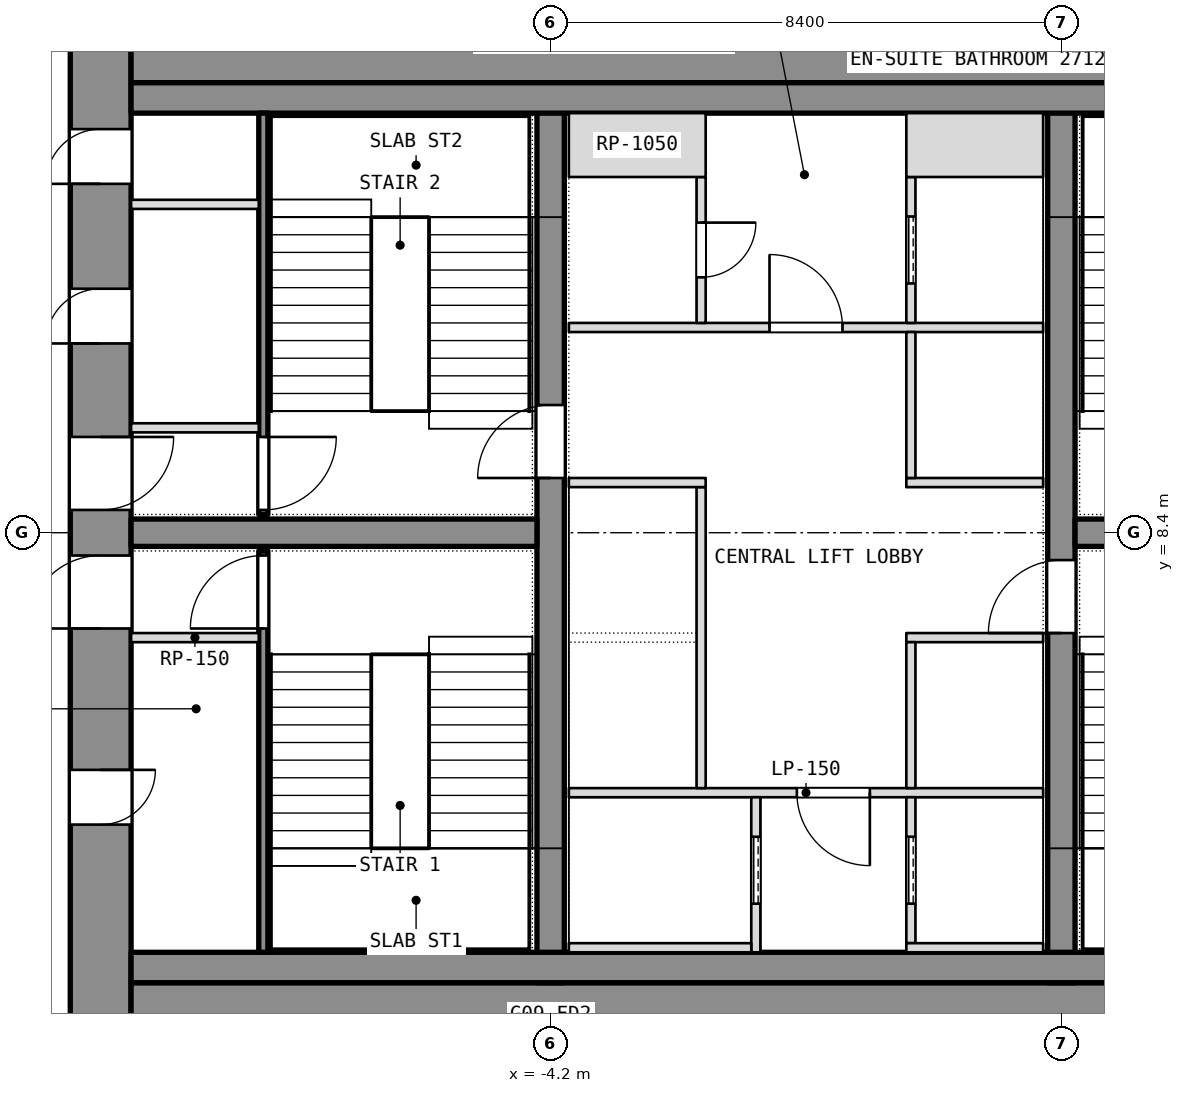
"""IFC4 building model, lengths in metres.
Left out: names, types, materials, properties, quantities, classifications, styles, units other than length and angle.
Written with IfcOpenShell. Run it as: python <this file> out.ifc"""

import sys

from ifc_helpers import new_model, si_unit, direction, frame, frame_2d, origin, place, context, subcontext, project, spatial, rectangle, extrude, element, fill, save


model = new_model("IFC4")
c1 = context("Model", 3, precision=1e-05, world=origin(), true_north=direction((0.0, 1.0)))
c2 = subcontext(c1, "Body", "Model", "MODEL_VIEW")
j1 = project(units=[si_unit("LENGTHUNIT", "METRE"), si_unit("PLANEANGLEUNIT", "RADIAN")], contexts=[c1])
p1 = place(None, origin())
s1 = spatial("IfcSite", under=j1, at=p1, CompositionType="ELEMENT")
p2 = place(p1, origin())
s2 = spatial("IfcBuilding", under=s1, at=p2, CompositionType="ELEMENT")
p3 = place(p2, frame((0.0, 0.0, 122.9)))
s3 = spatial("IfcBuildingStorey", under=s2, at=p3, CompositionType="ELEMENT", Elevation=122.9)
p4 = place(p3, frame((-11.6, 0.0, 0.0), z_axis=(0.0, 0.0, 1.0), x_axis=(0.0, 1.0, 0.0)))
e1 = element("IfcWall", 1, at=p4, inside=s3, PredefinedType="SHEAR", context=c2, shape_type="SweptSolid", body=[
    extrude(rectangle(XDim=16.8, YDim=1.0, at=frame_2d((8.4, 0.0))), origin(), (0.0, 0.0, 1.0), 3.6),
])
p5 = place(p4, frame((3.6, 0.0, 0.0)))
e2 = element("IfcOpeningElement", 2, at=p5, cuts=e1, PredefinedType="OPENING", context=c2, shape_type="SweptSolid", body=[
    extrude(rectangle(XDim=0.9, YDim=2.1, at=frame_2d((0.45, 1.05))), frame((0.0, 0.5, 0.0), z_axis=(0.0, -1.0, 0.0), x_axis=(1.0, 0.0, 0.0)), (0.0, 0.0, 1.0), 1.0),
])
p6 = place(p4, frame((6.825, 0.0, 0.0)))
e3 = element("IfcOpeningElement", 3, at=p6, cuts=e1, PredefinedType="OPENING", context=c2, shape_type="SweptSolid", body=[
    extrude(rectangle(XDim=1.2, YDim=2.1, at=frame_2d((0.6, 1.05))), frame((0.0, 0.5, 0.0), z_axis=(0.0, -1.0, 0.0), x_axis=(1.0, 0.0, 0.0)), (0.0, 0.0, 1.0), 1.0),
])
p7 = place(p4, frame((14.137, 0.0, 0.0)))
e4 = element("IfcOpeningElement", 4, at=p7, cuts=e1, PredefinedType="OPENING", context=c2, shape_type="SweptSolid", body=[
    extrude(rectangle(XDim=0.9, YDim=2.1, at=frame_2d((0.45, 1.05))), frame((0.0, 0.5, 0.0), z_axis=(0.0, -1.0, 0.0), x_axis=(1.0, 0.0, 0.0)), (0.0, 0.0, 1.0), 1.0),
])
p8 = place(p4, frame((11.512, 0.0, 0.0)))
e5 = element("IfcOpeningElement", 5, at=p8, cuts=e1, PredefinedType="OPENING", context=c2, shape_type="SweptSolid", body=[
    extrude(rectangle(XDim=0.9, YDim=2.1, at=frame_2d((0.45, 1.05))), frame((0.0, 0.5, 0.0), z_axis=(0.0, -1.0, 0.0), x_axis=(1.0, 0.0, 0.0)), (0.0, 0.0, 1.0), 1.0),
])
p9 = place(p4, frame((8.775, 0.0, 0.0)))
e6 = element("IfcOpeningElement", 6, at=p9, cuts=e1, PredefinedType="OPENING", context=c2, shape_type="SweptSolid", body=[
    extrude(rectangle(XDim=1.2, YDim=2.1, at=frame_2d((0.6, 1.05))), frame((0.0, 0.5, 0.0), z_axis=(0.0, -1.0, 0.0), x_axis=(1.0, 0.0, 0.0)), (0.0, 0.0, 1.0), 1.0),
])
for number, where, z_axis, x_axis in (
    (7, (-11.1, 0.5, 0.0), (0.0, 0.0, 1.0), (1.0, 0.0, 0.0)),
    (8, (-11.1, 16.3, 0.0), (0.0, 0.0, 1.0), (1.0, 0.0, 0.0)),
):
    element("IfcWall", number, at=place(p3, frame(where, z_axis=z_axis, x_axis=x_axis)), inside=s3, PredefinedType="SHEAR", context=c2, shape_type="SweptSolid", body=[
        extrude(rectangle(XDim=22.2, YDim=1.0, at=frame_2d((11.1, 0.0))), origin(), (0.0, 0.0, 1.0), 3.6),
    ])
p10 = place(p3, frame((-4.2, 1.0, 0.0), z_axis=(0.0, 0.0, 1.0), x_axis=(0.0, 1.0, 0.0)))
e9 = element("IfcWall", 9, at=p10, inside=s3, PredefinedType="SHEAR", context=c2, shape_type="SweptSolid", body=[
    extrude(rectangle(XDim=14.8, YDim=0.45, at=frame_2d((7.4, 0.0))), origin(), (0.0, 0.0, 1.0), 3.6),
])
p11 = place(p10, frame((8.3, 0.0, 0.0)))
e10 = element("IfcOpeningElement", 10, at=p11, cuts=e9, PredefinedType="OPENING", context=c2, shape_type="SweptSolid", body=[
    extrude(rectangle(XDim=1.2, YDim=2.1, at=frame_2d((0.6, 1.05))), frame((0.0, 0.225, 0.0), z_axis=(0.0, -1.0, 0.0), x_axis=(1.0, 0.0, 0.0)), (0.0, 0.0, 1.0), 0.45),
])
p12 = place(p3, frame((4.2, 1.0, 0.0), z_axis=(0.0, 0.0, 1.0), x_axis=(0.0, 1.0, 0.0)))
e11 = element("IfcWall", 11, at=p12, inside=s3, PredefinedType="SHEAR", context=c2, shape_type="SweptSolid", body=[
    extrude(rectangle(XDim=14.8, YDim=0.45, at=frame_2d((7.4, 0.0))), origin(), (0.0, 0.0, 1.0), 3.6),
])
p13 = place(p12, frame((5.75, 0.0, 0.0)))
e12 = element("IfcOpeningElement", 12, at=p13, cuts=e11, PredefinedType="OPENING", context=c2, shape_type="SweptSolid", body=[
    extrude(rectangle(XDim=1.2, YDim=2.1, at=frame_2d((0.6, 1.05))), frame((0.0, 0.225, 0.0), z_axis=(0.0, -1.0, 0.0), x_axis=(1.0, 0.0, 0.0)), (0.0, 0.0, 1.0), 0.45),
])
for number, where, z_axis, x_axis in (
    (13, (-11.1, 8.4, 0.0), (0.0, 0.0, 1.0), (1.0, 0.0, 0.0)),
    (14, (4.425, 8.4, 0.0), (0.0, 0.0, 1.0), (1.0, 0.0, 0.0)),
):
    element("IfcWall", number, at=place(p3, frame(where, z_axis=z_axis, x_axis=x_axis)), inside=s3, PredefinedType="SHEAR", context=c2, shape_type="SweptSolid", body=[
        extrude(rectangle(XDim=6.675, YDim=0.45, at=frame_2d((3.337, 0.0))), origin(), (0.0, 0.0, 1.0), 3.6),
    ])
for number, where, z_axis, x_axis in (
    (15, (-11.1, 1.25, 0.0), (0.0, 0.0, 1.0), (1.0, 0.0, 0.0)),
    (16, (-11.1, 15.55, 0.0), (0.0, 0.0, 1.0), (1.0, 0.0, 0.0)),
):
    element("IfcWall", number, at=place(p3, frame(where, z_axis=z_axis, x_axis=x_axis)), inside=s3, PredefinedType="PARTITIONING", context=c2, shape_type="SweptSolid", body=[
        extrude(rectangle(XDim=22.2, YDim=0.5, at=frame_2d((11.1, 0.0))), origin(), (0.0, 0.0, 1.0), 3.34),
    ])
p14 = place(p3, frame((-8.925, 1.5, 0.0), z_axis=(0.0, 0.0, 1.0), x_axis=(0.0, 1.0, 0.0)))
e17 = element("IfcWall", 17, at=p14, inside=s3, PredefinedType="SHEAR", context=c2, shape_type="SweptSolid", body=[
    extrude(rectangle(XDim=6.6, YDim=0.15, at=frame_2d((3.3, 0.0))), origin(), (0.0, 0.0, 1.0), 3.34),
])
p15 = place(p14, frame((5.325, 0.0, 0.0)))
e18 = element("IfcOpeningElement", 18, at=p15, cuts=e17, PredefinedType="OPENING", context=c2, shape_type="SweptSolid", body=[
    extrude(rectangle(XDim=1.2, YDim=2.1, at=frame_2d((0.6, 1.05))), frame((0.0, 0.075, 0.0), z_axis=(0.0, -1.0, 0.0), x_axis=(1.0, 0.0, 0.0)), (0.0, 0.0, 1.0), 0.15),
])
p16 = place(p3, frame((-11.1, 6.675, 0.0), z_axis=(0.0, 0.0, 1.0), x_axis=(1.0, 0.0, 0.0)))
e19 = element("IfcWall", 19, at=p16, inside=s3, PredefinedType="PARTITIONING", context=c2, shape_type="SweptSolid", body=[
    extrude(rectangle(XDim=2.1, YDim=0.15, at=frame_2d((1.05, 0.0))), origin(), (0.0, 0.0, 1.0), 3.34),
])
p17 = place(p3, frame((-8.925, 8.7, 0.0), z_axis=(0.0, 0.0, 1.0), x_axis=(0.0, 1.0, 0.0)))
e20 = element("IfcWall", 20, at=p17, inside=s3, PredefinedType="SHEAR", context=c2, shape_type="SweptSolid", body=[
    extrude(rectangle(XDim=6.6, YDim=0.15, at=frame_2d((3.3, 0.0))), origin(), (0.0, 0.0, 1.0), 3.34),
])
p18 = place(p17, frame((0.075, 0.0, 0.0)))
e21 = element("IfcOpeningElement", 21, at=p18, cuts=e20, PredefinedType="OPENING", context=c2, shape_type="SweptSolid", body=[
    extrude(rectangle(XDim=1.2, YDim=2.1, at=frame_2d((0.6, 1.05))), frame((0.0, 0.075, 0.0), z_axis=(0.0, -1.0, 0.0), x_axis=(1.0, 0.0, 0.0)), (0.0, 0.0, 1.0), 0.15),
])
for number, where, z_axis, x_axis in (
    (22, (-11.1, 10.125, 0.0), (0.0, 0.0, 1.0), (1.0, 0.0, 0.0)),
    (23, (-11.1, 13.8, 0.0), (0.0, 0.0, 1.0), (1.0, 0.0, 0.0)),
):
    element("IfcWall", number, at=place(p3, frame(where, z_axis=z_axis, x_axis=x_axis)), inside=s3, PredefinedType="PARTITIONING", context=c2, shape_type="SweptSolid", body=[
        extrude(rectangle(XDim=2.1, YDim=0.15, at=frame_2d((1.05, 0.0))), origin(), (0.0, 0.0, 1.0), 3.34),
    ])
p19 = place(p3, frame((-3.9, 4.125, 0.0), z_axis=(0.0, 0.0, 1.0), x_axis=(1.0, 0.0, 0.0)))
e24 = element("IfcWall", 24, at=p19, inside=s3, PredefinedType="PARTITIONING", context=c2, shape_type="SweptSolid", body=[
    extrude(rectangle(XDim=7.8, YDim=0.15, at=frame_2d((3.9, 0.0))), origin(), (0.0, 0.0, 1.0), 3.34),
])
p20 = place(p19, frame((3.75, 0.0, 0.0)))
e25 = element("IfcOpeningElement", 25, at=p20, cuts=e24, PredefinedType="OPENING", context=c2, shape_type="SweptSolid", body=[
    extrude(rectangle(XDim=1.2, YDim=2.1, at=frame_2d((0.6, 1.05))), frame((0.0, 0.075, 0.0), z_axis=(0.0, -1.0, 0.0), x_axis=(1.0, 0.0, 0.0)), (0.0, 0.0, 1.0), 0.15),
])
p21 = place(p3, frame((-3.9, 11.775, 0.0), z_axis=(0.0, 0.0, 1.0), x_axis=(1.0, 0.0, 0.0)))
e26 = element("IfcWall", 26, at=p21, inside=s3, PredefinedType="PARTITIONING", context=c2, shape_type="SweptSolid", body=[
    extrude(rectangle(XDim=7.8, YDim=0.15, at=frame_2d((3.9, 0.0))), origin(), (0.0, 0.0, 1.0), 3.34),
])
p22 = place(p21, frame((3.3, 0.0, 0.0)))
e27 = element("IfcOpeningElement", 27, at=p22, cuts=e26, PredefinedType="OPENING", context=c2, shape_type="SweptSolid", body=[
    extrude(rectangle(XDim=1.2, YDim=2.1, at=frame_2d((0.6, 1.05))), frame((0.0, 0.075, 0.0), z_axis=(0.0, -1.0, 0.0), x_axis=(1.0, 0.0, 0.0)), (0.0, 0.0, 1.0), 0.15),
])
p23 = place(p3, frame((-0.825, 1.5, 0.0), z_axis=(0.0, 0.0, 1.0), x_axis=(0.0, 1.0, 0.0)))
e28 = element("IfcWall", 28, at=p23, inside=s3, PredefinedType="SHEAR", context=c2, shape_type="SweptSolid", body=[
    extrude(rectangle(XDim=2.55, YDim=0.15, at=frame_2d((1.275, 0.0))), origin(), (0.0, 0.0, 1.0), 3.6),
])
p24 = place(p23, frame((0.8, 0.0, 0.0)))
e29 = element("IfcOpeningElement", 29, at=p24, cuts=e28, PredefinedType="OPENING", context=c2, shape_type="SweptSolid", body=[
    extrude(rectangle(XDim=1.1, YDim=2.1, at=frame_2d((0.55, 1.05))), frame((0.0, 0.075, 0.0), z_axis=(0.0, -1.0, 0.0), x_axis=(1.0, 0.0, 0.0)), (0.0, 0.0, 1.0), 0.15),
])
p25 = place(p3, frame((-3.9, 1.575, 0.0), z_axis=(0.0, 0.0, 1.0), x_axis=(1.0, 0.0, 0.0)))
e30 = element("IfcWall", 30, at=p25, inside=s3, PredefinedType="SHEAR", context=c2, shape_type="SweptSolid", body=[
    extrude(rectangle(XDim=3.0, YDim=0.15, at=frame_2d((1.5, 0.0))), origin(), (0.0, 0.0, 1.0), 3.6),
])
p26 = place(p3, frame((-1.725, 4.2, 0.0), z_axis=(0.0, 0.0, 1.0), x_axis=(0.0, 1.0, 0.0)))
e31 = element("IfcWall", 31, at=p26, inside=s3, PredefinedType="SHEAR", context=c2, shape_type="SweptSolid", body=[
    extrude(rectangle(XDim=4.95, YDim=0.15, at=frame_2d((2.475, 0.0))), origin(), (0.0, 0.0, 1.0), 3.6),
])
p27 = place(p3, frame((-3.9, 9.225, 0.0), z_axis=(0.0, 0.0, 1.0), x_axis=(1.0, 0.0, 0.0)))
e32 = element("IfcWall", 32, at=p27, inside=s3, PredefinedType="SHEAR", context=c2, shape_type="SweptSolid", body=[
    extrude(rectangle(XDim=2.25, YDim=0.15, at=frame_2d((1.125, 0.0))), origin(), (0.0, 0.0, 1.0), 3.6),
])
p28 = place(p3, frame((-1.725, 11.85, 0.0), z_axis=(0.0, 0.0, 1.0), x_axis=(0.0, 1.0, 0.0)))
e33 = element("IfcWall", 33, at=p28, inside=s3, PredefinedType="PARTITIONING", context=c2, shape_type="SweptSolid", body=[
    extrude(rectangle(XDim=2.4, YDim=0.15, at=frame_2d((1.2, 0.0))), origin(), (0.0, 0.0, 1.0), 3.34),
])
p29 = place(p28, frame((0.75, 0.0, 0.0)))
e34 = element("IfcOpeningElement", 34, at=p29, cuts=e33, PredefinedType="OPENING", context=c2, shape_type="SweptSolid", body=[
    extrude(rectangle(XDim=0.9, YDim=2.1, at=frame_2d((0.45, 1.05))), frame((0.0, 0.075, 0.0), z_axis=(0.0, -1.0, 0.0), x_axis=(1.0, 0.0, 0.0)), (0.0, 0.0, 1.0), 0.15),
])
p30 = place(p3, frame((-3.9, 14.775, 0.0), z_axis=(0.0, 0.0, 1.0), x_axis=(1.0, 0.0, 0.0)))
e35 = element("IfcWall", 35, at=p30, inside=s3, PredefinedType="PARTITIONING", context=c2, shape_type="SweptSolid", body=[
    extrude(rectangle(XDim=2.25, YDim=1.05, at=frame_2d((1.125, 0.0))), origin(), (0.0, 0.0, 1.0), 3.34),
])
p31 = place(p3, frame((1.725, 1.65, 0.0), z_axis=(0.0, 0.0, 1.0), x_axis=(0.0, 1.0, 0.0)))
e36 = element("IfcWall", 36, at=p31, inside=s3, PredefinedType="SHEAR", context=c2, shape_type="SweptSolid", body=[
    extrude(rectangle(XDim=2.4, YDim=0.15, at=frame_2d((1.2, 0.0))), origin(), (0.0, 0.0, 1.0), 3.6),
])
p32 = place(p31, frame((0.65, 0.0, 0.0)))
e37 = element("IfcOpeningElement", 37, at=p32, cuts=e36, PredefinedType="OPENING", context=c2, shape_type="SweptSolid", body=[
    extrude(rectangle(XDim=1.1, YDim=2.1, at=frame_2d((0.55, 1.05))), frame((0.0, 0.075, 0.0), z_axis=(0.0, -1.0, 0.0), x_axis=(1.0, 0.0, 0.0)), (0.0, 0.0, 1.0), 0.15),
])
p33 = place(p3, frame((1.65, 1.575, 0.0), z_axis=(0.0, 0.0, 1.0), x_axis=(1.0, 0.0, 0.0)))
e38 = element("IfcWall", 38, at=p33, inside=s3, PredefinedType="SHEAR", context=c2, shape_type="SweptSolid", body=[
    extrude(rectangle(XDim=2.25, YDim=0.15, at=frame_2d((1.125, 0.0))), origin(), (0.0, 0.0, 1.0), 3.6),
])
p34 = place(p3, frame((1.725, 11.85, 0.0), z_axis=(0.0, 0.0, 1.0), x_axis=(0.0, 1.0, 0.0)))
e39 = element("IfcWall", 39, at=p34, inside=s3, PredefinedType="SHEAR", context=c2, shape_type="SweptSolid", body=[
    extrude(rectangle(XDim=2.4, YDim=0.15, at=frame_2d((1.2, 0.0))), origin(), (0.0, 0.0, 1.0), 3.6),
])
p35 = place(p34, frame((0.65, 0.0, 0.0)))
e40 = element("IfcOpeningElement", 40, at=p35, cuts=e39, PredefinedType="OPENING", context=c2, shape_type="SweptSolid", body=[
    extrude(rectangle(XDim=1.1, YDim=2.1, at=frame_2d((0.55, 1.05))), frame((0.0, 0.075, 0.0), z_axis=(0.0, -1.0, 0.0), x_axis=(1.0, 0.0, 0.0)), (0.0, 0.0, 1.0), 0.15),
])
p36 = place(p3, frame((1.65, 14.775, 0.0), z_axis=(0.0, 0.0, 1.0), x_axis=(1.0, 0.0, 0.0)))
e41 = element("IfcWall", 41, at=p36, inside=s3, PredefinedType="SHEAR", context=c2, shape_type="SweptSolid", body=[
    extrude(rectangle(XDim=2.25, YDim=1.05, at=frame_2d((1.125, 0.0))), origin(), (0.0, 0.0, 1.0), 3.6),
])
for number, where, z_axis, x_axis in (
    (42, (1.65, 6.675, 0.0), (0.0, 0.0, 1.0), (1.0, 0.0, 0.0)),
    (43, (1.65, 9.225, 0.0), (0.0, 0.0, 1.0), (1.0, 0.0, 0.0)),
):
    element("IfcWall", number, at=place(p3, frame(where, z_axis=z_axis, x_axis=x_axis)), inside=s3, PredefinedType="SHEAR", context=c2, shape_type="SweptSolid", body=[
        extrude(rectangle(XDim=2.25, YDim=0.15, at=frame_2d((1.125, 0.0))), origin(), (0.0, 0.0, 1.0), 3.6),
    ])
p37 = place(p3, frame((1.725, 4.2, 0.0), z_axis=(0.0, 0.0, 1.0), x_axis=(0.0, 1.0, 0.0)))
e44 = element("IfcWall", 44, at=p37, inside=s3, PredefinedType="SHEAR", context=c2, shape_type="SweptSolid", body=[
    extrude(rectangle(XDim=2.4, YDim=0.15, at=frame_2d((1.2, 0.0))), origin(), (0.0, 0.0, 1.0), 3.6),
])
p38 = place(p3, frame((1.725, 9.3, 0.0), z_axis=(0.0, 0.0, 1.0), x_axis=(0.0, 1.0, 0.0)))
e45 = element("IfcWall", 45, at=p38, inside=s3, PredefinedType="SHEAR", context=c2, shape_type="SweptSolid", body=[
    extrude(rectangle(XDim=2.4, YDim=0.15, at=frame_2d((1.2, 0.0))), origin(), (0.0, 0.0, 1.0), 3.6),
])
p39 = place(p5, origin())
e46 = element("IfcDoor", 46, at=p39, inside=s3, OperationType="SINGLE_SWING_LEFT", PredefinedType="DOOR", context=c2, shape_type="SweptSolid", body=[
    extrude(rectangle(XDim=0.9, YDim=2.1, at=frame_2d((0.45, 1.05))), frame((0.0, 0.025, 0.0), z_axis=(0.0, -1.0, 0.0), x_axis=(1.0, 0.0, 0.0)), (0.0, 0.0, 1.0), 0.05),
])
fill(e2, e46)
p40 = place(p6, origin())
e47 = element("IfcDoor", 47, at=p40, inside=s3, OperationType="SINGLE_SWING_LEFT", PredefinedType="DOOR", context=c2, shape_type="SweptSolid", body=[
    extrude(rectangle(XDim=1.2, YDim=2.1, at=frame_2d((0.6, 1.05))), frame((0.0, 0.025, 0.0), z_axis=(0.0, -1.0, 0.0), x_axis=(1.0, 0.0, 0.0)), (0.0, 0.0, 1.0), 0.05),
])
fill(e3, e47)
p41 = place(p15, origin())
e48 = element("IfcDoor", 48, at=p41, inside=s3, OperationType="SINGLE_SWING_LEFT", PredefinedType="DOOR", context=c2, shape_type="SweptSolid", body=[
    extrude(rectangle(XDim=1.2, YDim=2.1, at=frame_2d((0.6, 1.05))), frame((0.0, 0.025, 0.0), z_axis=(0.0, -1.0, 0.0), x_axis=(1.0, 0.0, 0.0)), (0.0, 0.0, 1.0), 0.05),
])
fill(e18, e48)
p42 = place(p7, origin())
e49 = element("IfcDoor", 49, at=p42, inside=s3, OperationType="SINGLE_SWING_LEFT", PredefinedType="DOOR", context=c2, shape_type="SweptSolid", body=[
    extrude(rectangle(XDim=0.9, YDim=2.1, at=frame_2d((0.45, 1.05))), frame((0.0, 0.025, 0.0), z_axis=(0.0, -1.0, 0.0), x_axis=(1.0, 0.0, 0.0)), (0.0, 0.0, 1.0), 0.05),
])
fill(e4, e49)
p43 = place(p8, origin())
e50 = element("IfcDoor", 50, at=p43, inside=s3, OperationType="SINGLE_SWING_LEFT", PredefinedType="DOOR", context=c2, shape_type="SweptSolid", body=[
    extrude(rectangle(XDim=0.9, YDim=2.1, at=frame_2d((0.45, 1.05))), frame((0.0, 0.025, 0.0), z_axis=(0.0, -1.0, 0.0), x_axis=(1.0, 0.0, 0.0)), (0.0, 0.0, 1.0), 0.05),
])
fill(e5, e50)
p44 = place(p9, origin())
e51 = element("IfcDoor", 51, at=p44, inside=s3, OperationType="SINGLE_SWING_LEFT", PredefinedType="DOOR", context=c2, shape_type="SweptSolid", body=[
    extrude(rectangle(XDim=1.2, YDim=2.1, at=frame_2d((0.6, 1.05))), frame((0.0, 0.025, 0.0), z_axis=(0.0, -1.0, 0.0), x_axis=(1.0, 0.0, 0.0)), (0.0, 0.0, 1.0), 0.05),
])
fill(e6, e51)
p45 = place(p18, origin())
e52 = element("IfcDoor", 52, at=p45, inside=s3, OperationType="SINGLE_SWING_LEFT", PredefinedType="DOOR", context=c2, shape_type="SweptSolid", body=[
    extrude(rectangle(XDim=1.2, YDim=2.1, at=frame_2d((0.6, 1.05))), frame((0.0, 0.025, 0.0), z_axis=(0.0, -1.0, 0.0), x_axis=(1.0, 0.0, 0.0)), (0.0, 0.0, 1.0), 0.05),
])
fill(e21, e52)
p46 = place(p24, origin())
e53 = element("IfcDoor", 53, at=p46, inside=s3, OperationType="SLIDING_TO_LEFT", PredefinedType="DOOR", context=c2, shape_type="SweptSolid", body=[
    extrude(rectangle(XDim=1.1, YDim=2.1, at=frame_2d((0.55, 1.05))), frame((0.0, 0.025, 0.0), z_axis=(0.0, -1.0, 0.0), x_axis=(1.0, 0.0, 0.0)), (0.0, 0.0, 1.0), 0.05),
])
fill(e29, e53)
p47 = place(p32, origin())
e54 = element("IfcDoor", 54, at=p47, inside=s3, OperationType="SLIDING_TO_LEFT", PredefinedType="DOOR", context=c2, shape_type="SweptSolid", body=[
    extrude(rectangle(XDim=1.1, YDim=2.1, at=frame_2d((0.55, 1.05))), frame((0.0, 0.025, 0.0), z_axis=(0.0, -1.0, 0.0), x_axis=(1.0, 0.0, 0.0)), (0.0, 0.0, 1.0), 0.05),
])
fill(e37, e54)
p48 = place(p35, origin())
e55 = element("IfcDoor", 55, at=p48, inside=s3, OperationType="SLIDING_TO_LEFT", PredefinedType="DOOR", context=c2, shape_type="SweptSolid", body=[
    extrude(rectangle(XDim=1.1, YDim=2.1, at=frame_2d((0.55, 1.05))), frame((0.0, 0.025, 0.0), z_axis=(0.0, -1.0, 0.0), x_axis=(1.0, 0.0, 0.0)), (0.0, 0.0, 1.0), 0.05),
])
fill(e40, e55)
p49 = place(p20, origin())
e56 = element("IfcDoor", 56, at=p49, inside=s3, OperationType="SINGLE_SWING_LEFT", PredefinedType="DOOR", context=c2, shape_type="SweptSolid", body=[
    extrude(rectangle(XDim=1.2, YDim=2.1, at=frame_2d((0.6, 1.05))), frame((0.0, 0.025, 0.0), z_axis=(0.0, -1.0, 0.0), x_axis=(1.0, 0.0, 0.0)), (0.0, 0.0, 1.0), 0.05),
])
fill(e25, e56)
p50 = place(p22, origin())
e57 = element("IfcDoor", 57, at=p50, inside=s3, OperationType="SINGLE_SWING_LEFT", PredefinedType="DOOR", context=c2, shape_type="SweptSolid", body=[
    extrude(rectangle(XDim=1.2, YDim=2.1, at=frame_2d((0.6, 1.05))), frame((0.0, 0.025, 0.0), z_axis=(0.0, -1.0, 0.0), x_axis=(1.0, 0.0, 0.0)), (0.0, 0.0, 1.0), 0.05),
])
fill(e27, e57)
p51 = place(p29, origin())
e58 = element("IfcDoor", 58, at=p51, inside=s3, OperationType="SINGLE_SWING_LEFT", PredefinedType="DOOR", context=c2, shape_type="SweptSolid", body=[
    extrude(rectangle(XDim=0.9, YDim=2.1, at=frame_2d((0.45, 1.05))), frame((0.0, 0.025, 0.0), z_axis=(0.0, -1.0, 0.0), x_axis=(1.0, 0.0, 0.0)), (0.0, 0.0, 1.0), 0.05),
])
fill(e34, e58)
p52 = place(p11, origin())
e59 = element("IfcDoor", 59, at=p52, inside=s3, OperationType="SINGLE_SWING_LEFT", PredefinedType="DOOR", context=c2, shape_type="SweptSolid", body=[
    extrude(rectangle(XDim=1.2, YDim=2.1, at=frame_2d((0.6, 1.05))), frame((0.0, 0.025, 0.0), z_axis=(0.0, -1.0, 0.0), x_axis=(1.0, 0.0, 0.0)), (0.0, 0.0, 1.0), 0.05),
])
fill(e10, e59)
p53 = place(p13, origin())
e60 = element("IfcDoor", 60, at=p53, inside=s3, OperationType="SINGLE_SWING_LEFT", PredefinedType="DOOR", context=c2, shape_type="SweptSolid", body=[
    extrude(rectangle(XDim=1.2, YDim=2.1, at=frame_2d((0.6, 1.05))), frame((0.0, 0.025, 0.0), z_axis=(0.0, -1.0, 0.0), x_axis=(1.0, 0.0, 0.0)), (0.0, 0.0, 1.0), 0.05),
])
fill(e12, e60)
save(model, sys.argv[1])
